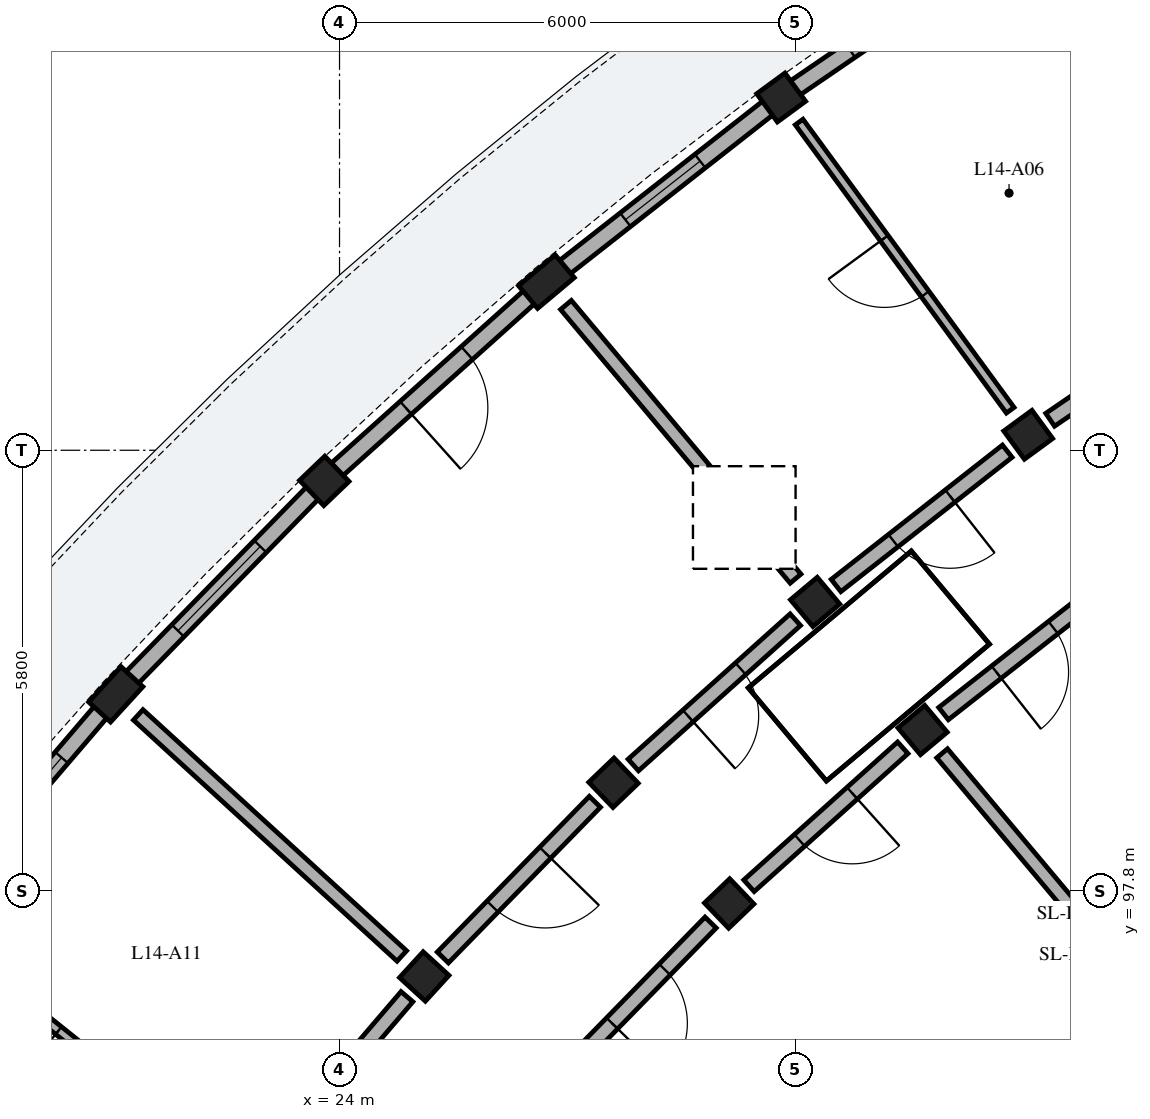
"""IFC4 building model, lengths in metres.
Left out: names, types, materials, properties, quantities, classifications, styles, units other than length and angle.
Written with IfcOpenShell. Run it as: python <this file> out.ifc"""

import sys

from ifc_helpers import new_model, si_unit, direction, frame, frame_2d, origin, origin_2d, place, context, subcontext, project, spatial, rectangle, extrude, element, fill, save


model = new_model("IFC4")
c1 = context("Model", 3, precision=1e-05, world=origin(), true_north=direction((0.0, 1.0)))
c2 = subcontext(c1, "Body", "Model", "MODEL_VIEW")
j1 = project(units=[si_unit("LENGTHUNIT", "METRE"), si_unit("PLANEANGLEUNIT", "RADIAN")], contexts=[c1])
p1 = place(None, origin())
s1 = spatial("IfcSite", under=j1, at=p1, CompositionType="ELEMENT")
p2 = place(p1, origin())
s2 = spatial("IfcBuilding", under=s1, at=p2, CompositionType="ELEMENT")
p3 = place(p2, frame((0.0, 0.0, 49.16)))
s3 = spatial("IfcBuildingStorey", under=s2, at=p3, CompositionType="ELEMENT", Elevation=49.16)
for number, where, z_axis, x_axis in (
    (1, (33.061, 103.804, 0.0), (0.0, 0.0, 1.0), (-0.591, 0.807, 0.0)),
    (2, (29.811, 108.241, 0.0), (0.0, 0.0, 1.0), (-0.591, 0.807, 0.0)),
    (3, (31.671, 99.919, 0.0), (0.0, 0.0, 1.0), (-0.643, 0.766, 0.0)),
    (4, (30.257, 101.605, 0.0), (0.0, 0.0, 1.0), (-0.643, 0.766, 0.0)),
):
    element("IfcColumn", number, at=place(p3, frame(where, z_axis=z_axis, x_axis=x_axis)), inside=s3, PredefinedType="COLUMN", context=c2, shape_type="SweptSolid", body=[
        extrude(rectangle(XDim=0.46, YDim=0.46, at=origin_2d()), origin(), (0.0, 0.0, 1.0), 3.1),
    ])
p4 = place(p3, frame((26.722, 105.818, 0.0), z_axis=(0.0, 0.0, 1.0), x_axis=(-0.642787636427, 0.766044420681, 0.0)))
e5 = element("IfcColumn", 5, at=p4, inside=s3, PredefinedType="PILASTER", context=c2, shape_type="SweptSolid", body=[
    extrude(rectangle(XDim=0.39, YDim=0.63, at=origin_2d()), origin(), (0.0, 0.0, 1.0), 3.1),
])
for number, where, z_axis, x_axis in (
    (6, (29.127, 97.637, 0.0), (0.0, 0.0, 1.0), (-0.692, 0.722, 0.0)),
    (7, (27.605, 99.226, 0.0), (0.0, 0.0, 1.0), (-0.692, 0.722, 0.0)),
    (8, (23.8, 103.197, 0.0), (0.0, 0.0, 1.0), (-0.692, 0.722, 0.0)),
    (9, (25.115, 96.677, 0.0), (0.0, 0.0, 1.0), (-0.738, 0.675, 0.0)),
):
    element("IfcColumn", number, at=place(p3, frame(where, z_axis=z_axis, x_axis=x_axis)), inside=s3, PredefinedType="COLUMN", context=c2, shape_type="SweptSolid", body=[
        extrude(rectangle(XDim=0.46, YDim=0.46, at=origin_2d()), origin(), (0.0, 0.0, 1.0), 3.1),
    ])
p5 = place(p3, frame((21.056, 100.389, 0.0), z_axis=(0.0, 0.0, 1.0), x_axis=(-0.737932089665, 0.674874974378, 0.0)))
e10 = element("IfcColumn", 10, at=p5, inside=s3, PredefinedType="PILASTER", context=c2, shape_type="SweptSolid", body=[
    extrude(rectangle(XDim=0.39, YDim=0.63, at=origin_2d()), origin(), (0.0, 0.0, 1.0), 3.1),
])
p6 = place(p3, frame((32.916, 110.362, 0.0), z_axis=(0.0, 0.0, 1.0), x_axis=(-0.82580643372, -0.563953663014, 0.0)))
e11 = element("IfcWall", 11, at=p6, inside=s3, PredefinedType="SOLIDWALL", context=c2, shape_type="SweptSolid", body=[
    extrude(rectangle(XDim=3.561, YDim=0.225, at=frame_2d((1.78, 0.0))), origin(), (0.0, 0.0, 1.0), 2.355),
])
p7 = place(p6, frame((0.9, 0.0, 0.55)))
e12 = element("IfcOpeningElement", 12, at=p7, cuts=e11, PredefinedType="OPENING", context=c2, shape_type="SweptSolid", body=[
    extrude(rectangle(XDim=1.76, YDim=1.635, at=frame_2d((0.88, 0.817))), frame((0.0, 0.123, 0.0), z_axis=(0.0, -1.0, 0.0), x_axis=(1.0, 0.0, 0.0)), (0.0, 0.0, 1.0), 0.245),
])
p8 = place(p3, frame((29.653, 108.117, 0.0), z_axis=(0.0, 0.0, 1.0), x_axis=(-0.786786822338, -0.617224834396, 0.0)))
e13 = element("IfcWall", 13, at=p8, inside=s3, PredefinedType="SOLIDWALL", context=c2, shape_type="SweptSolid", body=[
    extrude(rectangle(XDim=3.561, YDim=0.225, at=frame_2d((1.78, 0.0))), origin(), (0.0, 0.0, 1.0), 2.355),
])
p9 = place(p8, frame((1.155, 0.0, 0.55)))
e14 = element("IfcOpeningElement", 14, at=p9, cuts=e13, PredefinedType="OPENING", context=c2, shape_type="SweptSolid", body=[
    extrude(rectangle(XDim=1.25, YDim=1.6, at=frame_2d((0.625, 0.8))), frame((0.0, 0.123, 0.0), z_axis=(0.0, -1.0, 0.0), x_axis=(1.0, 0.0, 0.0)), (0.0, 0.0, 1.0), 0.245),
])
p10 = place(p3, frame((26.599, 105.708, 0.0), z_axis=(0.0, 0.0, 1.0), x_axis=(-0.744428403578, -0.667702292902, 0.0)))
e15 = element("IfcWall", 15, at=p10, inside=s3, PredefinedType="SOLIDWALL", context=c2, shape_type="SweptSolid", body=[
    extrude(rectangle(XDim=3.561, YDim=0.225, at=frame_2d((1.78, 0.0))), origin(), (0.0, 0.0, 1.0), 2.355),
])
p11 = place(p10, frame((1.24, 0.0, 0.0)))
e16 = element("IfcOpeningElement", 16, at=p11, cuts=e15, PredefinedType="OPENING", context=c2, shape_type="SweptSolid", body=[
    extrude(rectangle(XDim=1.08, YDim=2.15, at=frame_2d((0.54, 1.075))), frame((0.0, 0.123, 0.0), z_axis=(0.0, -1.0, 0.0), x_axis=(1.0, 0.0, 0.0)), (0.0, 0.0, 1.0), 0.245),
])
p12 = place(p3, frame((23.66, 103.054, 0.0), z_axis=(0.0, 0.0, 1.0), x_axis=(-0.698830915019, -0.715286902029, 0.0)))
e17 = element("IfcWall", 17, at=p12, inside=s3, PredefinedType="SOLIDWALL", context=c2, shape_type="SweptSolid", body=[
    extrude(rectangle(XDim=3.561, YDim=0.225, at=frame_2d((1.78, 0.0))), origin(), (0.0, 0.0, 1.0), 2.355),
])
p13 = place(p12, frame((1.005, 0.0, 0.35)))
e18 = element("IfcOpeningElement", 18, at=p13, cuts=e17, PredefinedType="OPENING", context=c2, shape_type="SweptSolid", body=[
    extrude(rectangle(XDim=1.55, YDim=1.75, at=frame_2d((0.775, 0.875))), frame((0.0, 0.123, 0.0), z_axis=(0.0, -1.0, 0.0), x_axis=(1.0, 0.0, 0.0)), (0.0, 0.0, 1.0), 0.245),
])
p14 = place(p3, frame((20.949, 100.263, 0.0), z_axis=(0.0, 0.0, 1.0), x_axis=(-0.650198292739, -0.759764555714, 0.0)))
e19 = element("IfcWall", 19, at=p14, inside=s3, PredefinedType="SOLIDWALL", context=c2, shape_type="SweptSolid", body=[
    extrude(rectangle(XDim=3.561, YDim=0.225, at=frame_2d((1.78, 0.0))), origin(), (0.0, 0.0, 1.0), 2.355),
])
p15 = place(p14, frame((0.93, 0.0, 0.35)))
e20 = element("IfcOpeningElement", 20, at=p15, cuts=e19, PredefinedType="OPENING", context=c2, shape_type="SweptSolid", body=[
    extrude(rectangle(XDim=1.7, YDim=1.8, at=frame_2d((0.85, 0.9))), frame((0.0, 0.123, 0.0), z_axis=(0.0, -1.0, 0.0), x_axis=(1.0, 0.0, 0.0)), (0.0, 0.0, 1.0), 0.245),
])
p16 = place(p3, frame((35.714, 105.616, 0.0), z_axis=(0.0, 0.0, 1.0), x_axis=(-0.825779671787, -0.563992848947, 0.0)))
e21 = element("IfcWall", 21, at=p16, inside=s3, PredefinedType="PARTITIONING", context=c2, shape_type="SweptSolid", body=[
    extrude(rectangle(XDim=2.863, YDim=0.205, at=frame_2d((1.432, 0.0))), origin(), (0.0, 0.0, 1.0), 2.37),
])
p17 = place(p16, frame((0.947, 0.0, 0.0)))
e22 = element("IfcOpeningElement", 22, at=p17, cuts=e21, PredefinedType="OPENING", context=c2, shape_type="SweptSolid", body=[
    extrude(rectangle(XDim=0.97, YDim=2.15, at=frame_2d((0.485, 1.075))), frame((0.0, 0.113, 0.0), z_axis=(0.0, -1.0, 0.0), x_axis=(1.0, 0.0, 0.0)), (0.0, 0.0, 1.0), 0.225),
])
p18 = place(p3, frame((32.824, 104.126, 0.0), z_axis=(0.0, 0.0, 1.0), x_axis=(-0.590910940129, 0.806736797745, 0.0)))
e23 = element("IfcWall", 23, at=p18, inside=s3, PredefinedType="PARTITIONING", context=c2, shape_type="SweptSolid", body=[
    extrude(rectangle(XDim=4.7, YDim=0.125, at=frame_2d((2.35, 0.0))), origin(), (0.0, 0.0, 1.0), 2.37),
])
p19 = place(p18, frame((1.895, 0.0, 0.0)))
e24 = element("IfcOpeningElement", 24, at=p19, cuts=e23, PredefinedType="OPENING", context=c2, shape_type="SweptSolid", body=[
    extrude(rectangle(XDim=0.91, YDim=2.1, at=frame_2d((0.455, 1.05))), frame((0.0, 0.073, 0.0), z_axis=(0.0, -1.0, 0.0), x_axis=(1.0, 0.0, 0.0)), (0.0, 0.0, 1.0), 0.145),
])
p20 = place(p3, frame((32.785, 103.588, 0.0), z_axis=(0.0, 0.0, 1.0), x_axis=(-0.786806323554, -0.617199975061, 0.0)))
e25 = element("IfcWall", 25, at=p20, inside=s3, PredefinedType="PARTITIONING", context=c2, shape_type="SweptSolid", body=[
    extrude(rectangle(XDim=2.863, YDim=0.205, at=frame_2d((1.432, 0.0))), origin(), (0.0, 0.0, 1.0), 2.37),
])
p21 = place(p20, frame((0.957, 0.0, 0.0)))
e26 = element("IfcOpeningElement", 26, at=p21, cuts=e25, PredefinedType="OPENING", context=c2, shape_type="SweptSolid", body=[
    extrude(rectangle(XDim=0.95, YDim=2.13, at=frame_2d((0.475, 1.065))), frame((0.0, 0.113, 0.0), z_axis=(0.0, -1.0, 0.0), x_axis=(1.0, 0.0, 0.0)), (0.0, 0.0, 1.0), 0.225),
])
p22 = place(p3, frame((34.085, 101.813, 0.0), z_axis=(0.0, 0.0, 1.0), x_axis=(-0.786835457019, -0.617162833924, 0.0)))
e27 = element("IfcWall", 27, at=p22, inside=s3, PredefinedType="PARTITIONING", context=c2, shape_type="SweptSolid", body=[
    extrude(rectangle(XDim=2.718, YDim=0.205, at=frame_2d((1.359, 0.0))), origin(), (0.0, 0.0, 1.0), 2.37),
])
p23 = place(p22, frame((0.884, 0.0, 0.0)))
e28 = element("IfcOpeningElement", 28, at=p23, cuts=e27, PredefinedType="OPENING", context=c2, shape_type="SweptSolid", body=[
    extrude(rectangle(XDim=0.95, YDim=2.13, at=frame_2d((0.475, 1.065))), frame((0.0, 0.113, 0.0), z_axis=(0.0, -1.0, 0.0), x_axis=(1.0, 0.0, 0.0)), (0.0, 0.0, 1.0), 0.225),
])
p24 = place(p3, frame((30.0, 101.911, 0.0), z_axis=(0.0, 0.0, 1.0), x_axis=(-0.642811926223, 0.766024038465, 0.0)))
e29 = element("IfcWall", 29, at=p24, inside=s3, PredefinedType="PARTITIONING", context=c2, shape_type="SweptSolid", body=[
    extrude(rectangle(XDim=4.7, YDim=0.185, at=frame_2d((2.35, 0.0))), origin(), (0.0, 0.0, 1.0), 2.37),
])
p25 = place(p3, frame((36.171, 94.557, 0.0), z_axis=(0.0, 0.0, 1.0), x_axis=(-0.642789470807, 0.766042881449, 0.0)))
e30 = element("IfcWall", 30, at=p25, inside=s3, PredefinedType="PARTITIONING", context=c2, shape_type="SweptSolid", body=[
    extrude(rectangle(XDim=6.6, YDim=0.185, at=frame_2d((3.3, 0.0))), origin(), (0.0, 0.0, 1.0), 2.37),
])
p26 = place(p3, frame((29.997, 101.371, 0.0), z_axis=(0.0, 0.0, 1.0), x_axis=(-0.744433521088, -0.667696587291, 0.0)))
e31 = element("IfcWall", 31, at=p26, inside=s3, PredefinedType="PARTITIONING", context=c2, shape_type="SweptSolid", body=[
    extrude(rectangle(XDim=2.863, YDim=0.205, at=frame_2d((1.432, 0.0))), origin(), (0.0, 0.0, 1.0), 2.37),
])
p27 = place(p26, frame((0.967, 0.0, 0.0)))
e32 = element("IfcOpeningElement", 32, at=p27, cuts=e31, PredefinedType="OPENING", context=c2, shape_type="SweptSolid", body=[
    extrude(rectangle(XDim=0.93, YDim=2.12, at=frame_2d((0.465, 1.06))), frame((0.0, 0.113, 0.0), z_axis=(0.0, -1.0, 0.0), x_axis=(1.0, 0.0, 0.0)), (0.0, 0.0, 1.0), 0.225),
])
p28 = place(p3, frame((31.411, 99.686, 0.0), z_axis=(0.0, 0.0, 1.0), x_axis=(-0.744418559135, -0.667713268413, 0.0)))
e33 = element("IfcWall", 33, at=p28, inside=s3, PredefinedType="PARTITIONING", context=c2, shape_type="SweptSolid", body=[
    extrude(rectangle(XDim=2.718, YDim=0.205, at=frame_2d((1.359, 0.0))), origin(), (0.0, 0.0, 1.0), 2.37),
])
p29 = place(p28, frame((0.894, 0.0, 0.0)))
e34 = element("IfcOpeningElement", 34, at=p29, cuts=e33, PredefinedType="OPENING", context=c2, shape_type="SweptSolid", body=[
    extrude(rectangle(XDim=0.93, YDim=2.12, at=frame_2d((0.465, 1.06))), frame((0.0, 0.113, 0.0), z_axis=(0.0, -1.0, 0.0), x_axis=(1.0, 0.0, 0.0)), (0.0, 0.0, 1.0), 0.225),
])
p30 = place(p3, frame((27.36, 98.975, 0.0), z_axis=(0.0, 0.0, 1.0), x_axis=(-0.698787219683, -0.715329589496, 0.0)))
e35 = element("IfcWall", 35, at=p30, inside=s3, PredefinedType="PARTITIONING", context=c2, shape_type="SweptSolid", body=[
    extrude(rectangle(XDim=2.863, YDim=0.205, at=frame_2d((1.432, 0.0))), origin(), (0.0, 0.0, 1.0), 2.37),
])
p31 = place(p30, frame((0.937, 0.0, 0.0)))
e36 = element("IfcOpeningElement", 36, at=p31, cuts=e35, PredefinedType="OPENING", context=c2, shape_type="SweptSolid", body=[
    extrude(rectangle(XDim=0.99, YDim=2.16, at=frame_2d((0.495, 1.08))), frame((0.0, 0.113, 0.0), z_axis=(0.0, -1.0, 0.0), x_axis=(1.0, 0.0, 0.0)), (0.0, 0.0, 1.0), 0.225),
])
p32 = place(p3, frame((28.882, 97.387, 0.0), z_axis=(0.0, 0.0, 1.0), x_axis=(-0.698840007829, -0.715278018296, 0.0)))
e37 = element("IfcWall", 37, at=p32, inside=s3, PredefinedType="PARTITIONING", context=c2, shape_type="SweptSolid", body=[
    extrude(rectangle(XDim=2.718, YDim=0.205, at=frame_2d((1.359, 0.0))), origin(), (0.0, 0.0, 1.0), 2.37),
])
p33 = place(p32, frame((0.864, 0.0, 0.0)))
e38 = element("IfcOpeningElement", 38, at=p33, cuts=e37, PredefinedType="OPENING", context=c2, shape_type="SweptSolid", body=[
    extrude(rectangle(XDim=0.99, YDim=2.16, at=frame_2d((0.495, 1.08))), frame((0.0, 0.113, 0.0), z_axis=(0.0, -1.0, 0.0), x_axis=(1.0, 0.0, 0.0)), (0.0, 0.0, 1.0), 0.225),
])
p34 = place(p3, frame((24.82, 96.947, 0.0), z_axis=(0.0, 0.0, 1.0), x_axis=(-0.737934199263, 0.674872667663, 0.0)))
e39 = element("IfcWall", 39, at=p34, inside=s3, PredefinedType="PARTITIONING", context=c2, shape_type="SweptSolid", body=[
    extrude(rectangle(XDim=4.7, YDim=0.185, at=frame_2d((2.35, 0.0))), origin(), (0.0, 0.0, 1.0), 2.37),
])
p35 = place(p3, frame((24.887, 96.411, 0.0), z_axis=(0.0, 0.0, 1.0), x_axis=(-0.650194272684, -0.759767996015, 0.0)))
e40 = element("IfcWall", 40, at=p35, inside=s3, PredefinedType="PARTITIONING", context=c2, shape_type="SweptSolid", body=[
    extrude(rectangle(XDim=2.863, YDim=0.205, at=frame_2d((1.432, 0.0))), origin(), (0.0, 0.0, 1.0), 2.37),
])
p36 = place(p35, frame((0.947, 0.0, 0.0)))
e41 = element("IfcOpeningElement", 41, at=p36, cuts=e40, PredefinedType="OPENING", context=c2, shape_type="SweptSolid", body=[
    extrude(rectangle(XDim=0.97, YDim=2.15, at=frame_2d((0.485, 1.075))), frame((0.0, 0.113, 0.0), z_axis=(0.0, -1.0, 0.0), x_axis=(1.0, 0.0, 0.0)), (0.0, 0.0, 1.0), 0.225),
])
p37 = place(p3, frame((22.486, 94.22, 0.0), z_axis=(0.0, 0.0, 1.0), x_axis=(-0.780807994362, 0.624771058821, 0.0)))
e42 = element("IfcWall", 42, at=p37, inside=s3, PredefinedType="PARTITIONING", context=c2, shape_type="SweptSolid", body=[
    extrude(rectangle(XDim=4.7, YDim=0.125, at=frame_2d((2.35, 0.0))), origin(), (0.0, 0.0, 1.0), 2.37),
])
p38 = place(p37, frame((1.905, 0.0, 0.0)))
e43 = element("IfcOpeningElement", 43, at=p38, cuts=e42, PredefinedType="OPENING", context=c2, shape_type="SweptSolid", body=[
    extrude(rectangle(XDim=0.89, YDim=2.1, at=frame_2d((0.445, 1.05))), frame((0.0, 0.073, 0.0), z_axis=(0.0, -1.0, 0.0), x_axis=(1.0, 0.0, 0.0)), (0.0, 0.0, 1.0), 0.145),
])
p39 = place(p7, origin())
e44 = element("IfcWindow", 44, at=p39, inside=s3, PartitioningType="SINGLE_PANEL", PredefinedType="WINDOW", context=c2, shape_type="SweptSolid", body=[
    extrude(rectangle(XDim=1.76, YDim=1.635, at=frame_2d((0.88, 0.817))), frame((0.0, 0.03, 0.0), z_axis=(0.0, -1.0, 0.0), x_axis=(1.0, 0.0, 0.0)), (0.0, 0.0, 1.0), 0.06),
])
fill(e12, e44)
p40 = place(p9, origin())
e45 = element("IfcWindow", 45, at=p40, inside=s3, PartitioningType="SINGLE_PANEL", PredefinedType="WINDOW", context=c2, shape_type="SweptSolid", body=[
    extrude(rectangle(XDim=1.25, YDim=1.6, at=frame_2d((0.625, 0.8))), frame((0.0, 0.03, 0.0), z_axis=(0.0, -1.0, 0.0), x_axis=(1.0, 0.0, 0.0)), (0.0, 0.0, 1.0), 0.06),
])
fill(e14, e45)
p41 = place(p11, origin())
e46 = element("IfcDoor", 46, at=p41, inside=s3, OperationType="SINGLE_SWING_RIGHT", PredefinedType="DOOR", context=c2, shape_type="SweptSolid", body=[
    extrude(rectangle(XDim=1.08, YDim=2.15, at=frame_2d((0.54, 1.075))), frame((0.0, 0.025, 0.0), z_axis=(0.0, -1.0, 0.0), x_axis=(1.0, 0.0, 0.0)), (0.0, 0.0, 1.0), 0.05),
])
fill(e16, e46)
p42 = place(p13, origin())
e47 = element("IfcWindow", 47, at=p42, inside=s3, PartitioningType="SINGLE_PANEL", PredefinedType="WINDOW", context=c2, shape_type="SweptSolid", body=[
    extrude(rectangle(XDim=1.55, YDim=1.75, at=frame_2d((0.775, 0.875))), frame((0.0, 0.03, 0.0), z_axis=(0.0, -1.0, 0.0), x_axis=(1.0, 0.0, 0.0)), (0.0, 0.0, 1.0), 0.06),
])
fill(e18, e47)
p43 = place(p15, origin())
e48 = element("IfcWindow", 48, at=p43, inside=s3, PartitioningType="SINGLE_PANEL", PredefinedType="WINDOW", context=c2, shape_type="SweptSolid", body=[
    extrude(rectangle(XDim=1.7, YDim=1.8, at=frame_2d((0.85, 0.9))), frame((0.0, 0.03, 0.0), z_axis=(0.0, -1.0, 0.0), x_axis=(1.0, 0.0, 0.0)), (0.0, 0.0, 1.0), 0.06),
])
fill(e20, e48)
p44 = place(p2, frame((0.0, 0.0, 52.52)))
p45 = place(p44, frame((0.0, 0.0, -0.26)))
p46 = place(p45, frame((29.325, 102.716, 0.21)))
e49 = element("IfcWindow", 49, at=p46, inside=s3, PartitioningType="SINGLE_PANEL", PredefinedType="SKYLIGHT", context=c2, shape_type="SweptSolid", body=[
    extrude(rectangle(XDim=1.35, YDim=1.35, at=origin_2d()), origin(), (0.0, 0.0, 1.0), 0.05),
])
p47 = place(p19, origin())
e50 = element("IfcDoor", 50, at=p47, inside=s3, OperationType="SINGLE_SWING_RIGHT", PredefinedType="DOOR", context=c2, shape_type="SweptSolid", body=[
    extrude(rectangle(XDim=0.91, YDim=2.1, at=frame_2d((0.455, 1.05))), frame((0.0, 0.025, 0.0), z_axis=(0.0, -1.0, 0.0), x_axis=(1.0, 0.0, 0.0)), (0.0, 0.0, 1.0), 0.05),
])
fill(e24, e50)
p48 = place(p21, origin())
e51 = element("IfcDoor", 51, at=p48, inside=s3, OperationType="SINGLE_SWING_LEFT", PredefinedType="DOOR", context=c2, shape_type="SweptSolid", body=[
    extrude(rectangle(XDim=0.95, YDim=2.13, at=frame_2d((0.475, 1.065))), frame((0.0, 0.025, 0.0), z_axis=(0.0, -1.0, 0.0), x_axis=(1.0, 0.0, 0.0)), (0.0, 0.0, 1.0), 0.05),
])
fill(e26, e51)
p49 = place(p23, origin())
e52 = element("IfcDoor", 52, at=p49, inside=s3, OperationType="SINGLE_SWING_RIGHT", PredefinedType="DOOR", context=c2, shape_type="SweptSolid", body=[
    extrude(rectangle(XDim=0.95, YDim=2.13, at=frame_2d((0.475, 1.065))), frame((0.0, 0.025, 0.0), z_axis=(0.0, -1.0, 0.0), x_axis=(1.0, 0.0, 0.0)), (0.0, 0.0, 1.0), 0.05),
])
fill(e28, e52)
p50 = place(p27, origin())
e53 = element("IfcDoor", 53, at=p50, inside=s3, OperationType="SINGLE_SWING_RIGHT", PredefinedType="DOOR", context=c2, shape_type="SweptSolid", body=[
    extrude(rectangle(XDim=0.93, YDim=2.12, at=frame_2d((0.465, 1.06))), frame((0.0, 0.025, 0.0), z_axis=(0.0, -1.0, 0.0), x_axis=(1.0, 0.0, 0.0)), (0.0, 0.0, 1.0), 0.05),
])
fill(e32, e53)
p51 = place(p29, origin())
e54 = element("IfcDoor", 54, at=p51, inside=s3, OperationType="SINGLE_SWING_LEFT", PredefinedType="DOOR", context=c2, shape_type="SweptSolid", body=[
    extrude(rectangle(XDim=0.93, YDim=2.12, at=frame_2d((0.465, 1.06))), frame((0.0, 0.025, 0.0), z_axis=(0.0, -1.0, 0.0), x_axis=(1.0, 0.0, 0.0)), (0.0, 0.0, 1.0), 0.05),
])
fill(e34, e54)
p52 = place(p31, origin())
e55 = element("IfcDoor", 55, at=p52, inside=s3, OperationType="SINGLE_SWING_LEFT", PredefinedType="DOOR", context=c2, shape_type="SweptSolid", body=[
    extrude(rectangle(XDim=0.99, YDim=2.16, at=frame_2d((0.495, 1.08))), frame((0.0, 0.025, 0.0), z_axis=(0.0, -1.0, 0.0), x_axis=(1.0, 0.0, 0.0)), (0.0, 0.0, 1.0), 0.05),
])
fill(e36, e55)
p53 = place(p33, origin())
e56 = element("IfcDoor", 56, at=p53, inside=s3, OperationType="SINGLE_SWING_RIGHT", PredefinedType="DOOR", context=c2, shape_type="SweptSolid", body=[
    extrude(rectangle(XDim=0.99, YDim=2.16, at=frame_2d((0.495, 1.08))), frame((0.0, 0.025, 0.0), z_axis=(0.0, -1.0, 0.0), x_axis=(1.0, 0.0, 0.0)), (0.0, 0.0, 1.0), 0.05),
])
fill(e38, e56)
p54 = place(p38, origin())
e57 = element("IfcDoor", 57, at=p54, inside=s3, OperationType="SINGLE_SWING_RIGHT", PredefinedType="DOOR", context=c2, shape_type="SweptSolid", body=[
    extrude(rectangle(XDim=0.89, YDim=2.1, at=frame_2d((0.445, 1.05))), frame((0.0, 0.025, 0.0), z_axis=(0.0, -1.0, 0.0), x_axis=(1.0, 0.0, 0.0)), (0.0, 0.0, 1.0), 0.05),
])
fill(e43, e57)
save(model, sys.argv[1])
